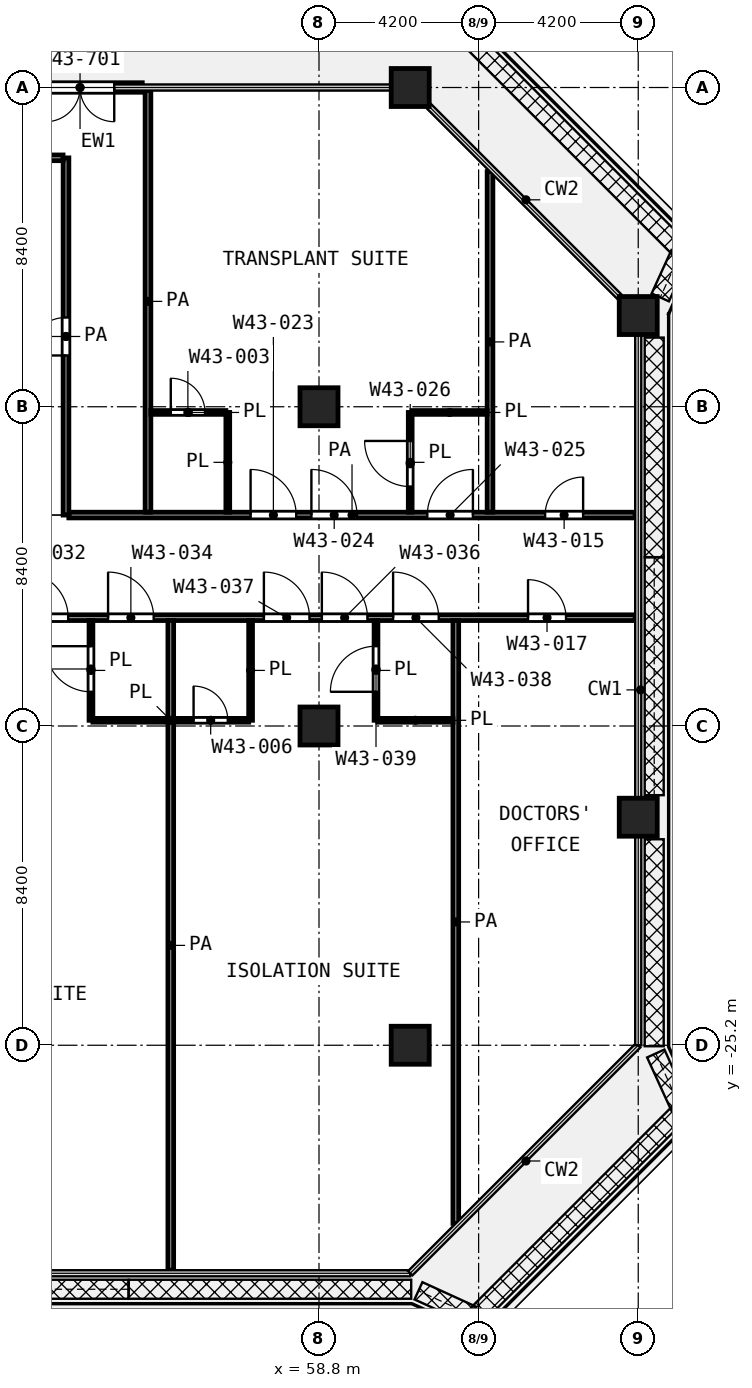
"""IFC4 building model, lengths in metres.
Left out: names, types, materials, properties, quantities, classifications, styles, units other than length and angle.
Written with IfcOpenShell. Run it as: python <this file> out.ifc"""

import sys

from ifc_helpers import new_model, si_unit, direction, frame, frame_2d, origin, origin_2d, place, context, subcontext, project, spatial, rectangle, extrude, element, fill, save


model = new_model("IFC4")
c1 = context("Model", 3, precision=1e-05, world=origin(), true_north=direction((0.0, 1.0)))
c2 = subcontext(c1, "Body", "Model", "MODEL_VIEW")
j1 = project(units=[si_unit("LENGTHUNIT", "METRE"), si_unit("PLANEANGLEUNIT", "RADIAN")], contexts=[c1])
p1 = place(None, origin())
s1 = spatial("IfcSite", under=j1, at=p1, CompositionType="ELEMENT")
p2 = place(p1, origin())
s2 = spatial("IfcBuilding", under=s1, at=p2, CompositionType="ELEMENT")
p3 = place(p2, frame((0.0, 0.0, 208.8)))
s3 = spatial("IfcBuildingStorey", under=s2, at=p3, CompositionType="ELEMENT", Elevation=208.8)
for number, where, z_axis, x_axis in (
    (1, (61.2, 0.0, 0.0), (0.0, 0.0, 1.0), (1.0, 0.0, 0.0)),
    (2, (67.2, -6.0, 0.0), (0.0, 0.0, 1.0), (1.0, 0.0, 0.0)),
    (3, (58.8, -8.4, 0.0), (0.0, 0.0, 1.0), (1.0, 0.0, 0.0)),
    (4, (58.8, -16.8, 0.0), (0.0, 0.0, 1.0), (1.0, 0.0, 0.0)),
    (5, (67.2, -19.2, 0.0), (0.0, 0.0, 1.0), (1.0, 0.0, 0.0)),
    (6, (61.2, -25.2, 0.0), (0.0, 0.0, 1.0), (1.0, 0.0, 0.0)),
):
    element("IfcColumn", number, at=place(p3, frame(where, z_axis=z_axis, x_axis=x_axis)), inside=s3, PredefinedType="COLUMN", context=c2, shape_type="SweptSolid", body=[
        extrude(rectangle(XDim=1.0, YDim=1.0, at=origin_2d()), origin(), (0.0, 0.0, 1.0), 4.2),
    ])
p4 = place(p3, frame((54.15, 0.0, 0.0), z_axis=(0.0, 0.0, 1.0), x_axis=(-1.0, 0.0, 0.0)))
e7 = element("IfcWall", 7, at=p4, inside=s3, PredefinedType="SOLIDWALL", context=c2, shape_type="SweptSolid", body=[
    extrude(rectangle(XDim=3.275, YDim=0.25, at=frame_2d((1.637, 0.0))), origin(), (0.0, 0.0, 1.0), 3.58),
])
p5 = place(p4, frame((0.738, 0.0, 0.0)))
e8 = element("IfcOpeningElement", 8, at=p5, cuts=e7, PredefinedType="OPENING", context=c2, shape_type="SweptSolid", body=[
    extrude(rectangle(XDim=1.8, YDim=2.1, at=frame_2d((0.9, 1.05))), frame((0.0, 0.135, 0.0), z_axis=(0.0, -1.0, 0.0), x_axis=(1.0, 0.0, 0.0)), (0.0, 0.0, 1.0), 0.27),
])
p6 = place(p3, frame((52.85, -16.65, 0.0), z_axis=(0.0, 0.0, 1.0), x_axis=(1.0, 0.0, 0.0)))
e9 = element("IfcWall", 9, at=p6, inside=s3, PredefinedType="PARTITIONING", context=c2, shape_type="SweptSolid", body=[
    extrude(rectangle(XDim=4.1, YDim=0.1, at=frame_2d((2.05, 0.0))), origin(), (0.0, 0.0, 1.0), 3.7),
])
p7 = place(p6, frame((2.65, 0.0, 0.0)))
e10 = element("IfcOpeningElement", 10, at=p7, cuts=e9, PredefinedType="OPENING", context=c2, shape_type="SweptSolid", body=[
    extrude(rectangle(XDim=0.9, YDim=2.1, at=frame_2d((0.45, 1.05))), frame((0.0, 0.06, 0.0), z_axis=(0.0, -1.0, 0.0), x_axis=(1.0, 0.0, 0.0)), (0.0, 0.0, 1.0), 0.12),
])
p8 = place(p3, frame((60.35, -16.65, 0.0), z_axis=(0.0, 0.0, 1.0), x_axis=(1.0, 0.0, 0.0)))
e11 = element("IfcWall", 11, at=p8, inside=s3, PredefinedType="PARTITIONING", context=c2, shape_type="SweptSolid", body=[
    extrude(rectangle(XDim=1.975, YDim=0.1, at=frame_2d((0.987, 0.0))), origin(), (0.0, 0.0, 1.0), 3.7),
])
p9 = place(p3, frame((54.375, -8.55, 0.0), z_axis=(0.0, 0.0, 1.0), x_axis=(1.0, 0.0, 0.0)))
e12 = element("IfcWall", 12, at=p9, inside=s3, PredefinedType="PARTITIONING", context=c2, shape_type="SweptSolid", body=[
    extrude(rectangle(XDim=1.975, YDim=0.1, at=frame_2d((0.988, 0.0))), origin(), (0.0, 0.0, 1.0), 3.7),
])
p10 = place(p9, frame((0.525, 0.0, 0.0)))
e13 = element("IfcOpeningElement", 13, at=p10, cuts=e12, PredefinedType="OPENING", context=c2, shape_type="SweptSolid", body=[
    extrude(rectangle(XDim=0.9, YDim=2.1, at=frame_2d((0.45, 1.05))), frame((0.0, 0.06, 0.0), z_axis=(0.0, -1.0, 0.0), x_axis=(1.0, 0.0, 0.0)), (0.0, 0.0, 1.0), 0.12),
])
p11 = place(p3, frame((61.25, -8.55, 0.0), z_axis=(0.0, 0.0, 1.0), x_axis=(1.0, 0.0, 0.0)))
e14 = element("IfcWall", 14, at=p11, inside=s3, PredefinedType="PARTITIONING", context=c2, shape_type="SweptSolid", body=[
    extrude(rectangle(XDim=1.975, YDim=0.1, at=frame_2d((0.988, 0.0))), origin(), (0.0, 0.0, 1.0), 3.7),
])
p12 = place(p3, frame((52.8, -16.65, 0.0), z_axis=(0.0, 0.0, 1.0), x_axis=(0.0, 1.0, 0.0)))
e15 = element("IfcWall", 15, at=p12, inside=s3, PredefinedType="PARTITIONING", context=c2, shape_type="SweptSolid", body=[
    extrude(rectangle(XDim=2.625, YDim=0.1, at=frame_2d((1.312, 0.0))), origin(), (0.0, 0.0, 1.0), 3.7),
])
p13 = place(p12, frame((0.75, 0.0, 0.0)))
e16 = element("IfcOpeningElement", 16, at=p13, cuts=e15, PredefinedType="OPENING", context=c2, shape_type="SweptSolid", body=[
    extrude(rectangle(XDim=1.2, YDim=2.1, at=frame_2d((0.6, 1.05))), frame((0.0, 0.06, 0.0), z_axis=(0.0, -1.0, 0.0), x_axis=(1.0, 0.0, 0.0)), (0.0, 0.0, 1.0), 0.12),
])
for number, where, z_axis, x_axis in (
    (17, (56.4, -11.175, 0.0), (0.0, 0.0, 1.0), (0.0, 1.0, 0.0)),
    (18, (57.0, -16.65, 0.0), (0.0, 0.0, 1.0), (0.0, 1.0, 0.0)),
):
    element("IfcWall", number, at=place(p3, frame(where, z_axis=z_axis, x_axis=x_axis)), inside=s3, PredefinedType="PARTITIONING", context=c2, shape_type="SweptSolid", body=[
        extrude(rectangle(XDim=2.625, YDim=0.1, at=frame_2d((1.312, 0.0))), origin(), (0.0, 0.0, 1.0), 3.7),
    ])
p14 = place(p3, frame((60.3, -16.65, 0.0), z_axis=(0.0, 0.0, 1.0), x_axis=(0.0, 1.0, 0.0)))
e19 = element("IfcWall", 19, at=p14, inside=s3, PredefinedType="PARTITIONING", context=c2, shape_type="SweptSolid", body=[
    extrude(rectangle(XDim=2.625, YDim=0.1, at=frame_2d((1.312, 0.0))), origin(), (0.0, 0.0, 1.0), 3.7),
])
p15 = place(p14, frame((0.75, 0.0, 0.0)))
e20 = element("IfcOpeningElement", 20, at=p15, cuts=e19, PredefinedType="OPENING", context=c2, shape_type="SweptSolid", body=[
    extrude(rectangle(XDim=1.2, YDim=2.1, at=frame_2d((0.6, 1.05))), frame((0.0, 0.06, 0.0), z_axis=(0.0, -1.0, 0.0), x_axis=(1.0, 0.0, 0.0)), (0.0, 0.0, 1.0), 0.12),
])
p16 = place(p3, frame((61.2, -11.175, 0.0), z_axis=(0.0, 0.0, 1.0), x_axis=(0.0, 1.0, 0.0)))
e21 = element("IfcWall", 21, at=p16, inside=s3, PredefinedType="PARTITIONING", context=c2, shape_type="SweptSolid", body=[
    extrude(rectangle(XDim=2.625, YDim=0.1, at=frame_2d((1.312, 0.0))), origin(), (0.0, 0.0, 1.0), 3.7),
])
p17 = place(p16, frame((0.675, 0.0, 0.0)))
e22 = element("IfcOpeningElement", 22, at=p17, cuts=e21, PredefinedType="OPENING", context=c2, shape_type="SweptSolid", body=[
    extrude(rectangle(XDim=1.2, YDim=2.1, at=frame_2d((0.6, 1.05))), frame((0.0, 0.06, 0.0), z_axis=(0.0, -1.0, 0.0), x_axis=(1.0, 0.0, 0.0)), (0.0, 0.0, 1.0), 0.12),
])
p18 = place(p3, frame((29.4, -13.95, 0.0), z_axis=(0.0, 0.0, 1.0), x_axis=(1.0, 0.0, 0.0)))
e23 = element("IfcWall", 23, at=p18, inside=s3, PredefinedType="PARTITIONING", context=c2, shape_type="SweptSolid", body=[
    extrude(rectangle(XDim=37.72, YDim=0.15, at=frame_2d((18.86, 0.0))), origin(), (0.0, 0.0, 1.0), 3.7),
])
p19 = place(p18, frame((1.6, 0.0, 0.0)))
e24 = element("IfcOpeningElement", 24, at=p19, cuts=e23, PredefinedType="OPENING", context=c2, shape_type="SweptSolid", body=[
    extrude(rectangle(XDim=1.0, YDim=2.1, at=frame_2d((0.5, 1.05))), frame((0.0, 0.085, 0.0), z_axis=(0.0, -1.0, 0.0), x_axis=(1.0, 0.0, 0.0)), (0.0, 0.0, 1.0), 0.17),
])
p20 = place(p18, frame((6.0, 0.0, 0.0)))
e25 = element("IfcOpeningElement", 25, at=p20, cuts=e23, PredefinedType="OPENING", context=c2, shape_type="SweptSolid", body=[
    extrude(rectangle(XDim=1.2, YDim=2.1, at=frame_2d((0.6, 1.05))), frame((0.0, 0.085, 0.0), z_axis=(0.0, -1.0, 0.0), x_axis=(1.0, 0.0, 0.0)), (0.0, 0.0, 1.0), 0.17),
])
p21 = place(p18, frame((12.975, 0.0, 0.0)))
e26 = element("IfcOpeningElement", 26, at=p21, cuts=e23, PredefinedType="OPENING", context=c2, shape_type="SweptSolid", body=[
    extrude(rectangle(XDim=1.2, YDim=2.1, at=frame_2d((0.6, 1.05))), frame((0.0, 0.085, 0.0), z_axis=(0.0, -1.0, 0.0), x_axis=(1.0, 0.0, 0.0)), (0.0, 0.0, 1.0), 0.17),
])
p22 = place(p18, frame((11.45, 0.0, 0.0)))
e27 = element("IfcOpeningElement", 27, at=p22, cuts=e23, PredefinedType="OPENING", context=c2, shape_type="SweptSolid", body=[
    extrude(rectangle(XDim=1.2, YDim=2.1, at=frame_2d((0.6, 1.05))), frame((0.0, 0.085, 0.0), z_axis=(0.0, -1.0, 0.0), x_axis=(1.0, 0.0, 0.0)), (0.0, 0.0, 1.0), 0.17),
])
p23 = place(p18, frame((14.85, 0.0, 0.0)))
e28 = element("IfcOpeningElement", 28, at=p23, cuts=e23, PredefinedType="OPENING", context=c2, shape_type="SweptSolid", body=[
    extrude(rectangle(XDim=1.2, YDim=2.1, at=frame_2d((0.6, 1.05))), frame((0.0, 0.085, 0.0), z_axis=(0.0, -1.0, 0.0), x_axis=(1.0, 0.0, 0.0)), (0.0, 0.0, 1.0), 0.17),
])
p24 = place(p18, frame((21.6, 0.0, 0.0)))
e29 = element("IfcOpeningElement", 29, at=p24, cuts=e23, PredefinedType="OPENING", context=c2, shape_type="SweptSolid", body=[
    extrude(rectangle(XDim=1.2, YDim=2.1, at=frame_2d((0.6, 1.05))), frame((0.0, 0.085, 0.0), z_axis=(0.0, -1.0, 0.0), x_axis=(1.0, 0.0, 0.0)), (0.0, 0.0, 1.0), 0.17),
])
p25 = place(p18, frame((20.1, 0.0, 0.0)))
e30 = element("IfcOpeningElement", 30, at=p25, cuts=e23, PredefinedType="OPENING", context=c2, shape_type="SweptSolid", body=[
    extrude(rectangle(XDim=1.2, YDim=2.1, at=frame_2d((0.6, 1.05))), frame((0.0, 0.085, 0.0), z_axis=(0.0, -1.0, 0.0), x_axis=(1.0, 0.0, 0.0)), (0.0, 0.0, 1.0), 0.17),
])
p26 = place(p18, frame((18.85, 0.0, 0.0)))
e31 = element("IfcOpeningElement", 31, at=p26, cuts=e23, PredefinedType="OPENING", context=c2, shape_type="SweptSolid", body=[
    extrude(rectangle(XDim=0.9, YDim=2.1, at=frame_2d((0.45, 1.05))), frame((0.0, 0.085, 0.0), z_axis=(0.0, -1.0, 0.0), x_axis=(1.0, 0.0, 0.0)), (0.0, 0.0, 1.0), 0.17),
])
p27 = place(p18, frame((23.85, 0.0, 0.0)))
e32 = element("IfcOpeningElement", 32, at=p27, cuts=e23, PredefinedType="OPENING", context=c2, shape_type="SweptSolid", body=[
    extrude(rectangle(XDim=1.2, YDim=2.1, at=frame_2d((0.6, 1.05))), frame((0.0, 0.085, 0.0), z_axis=(0.0, -1.0, 0.0), x_axis=(1.0, 0.0, 0.0)), (0.0, 0.0, 1.0), 0.17),
])
p28 = place(p18, frame((29.475, 0.0, 0.0)))
e33 = element("IfcOpeningElement", 33, at=p28, cuts=e23, PredefinedType="OPENING", context=c2, shape_type="SweptSolid", body=[
    extrude(rectangle(XDim=1.2, YDim=2.1, at=frame_2d((0.6, 1.05))), frame((0.0, 0.085, 0.0), z_axis=(0.0, -1.0, 0.0), x_axis=(1.0, 0.0, 0.0)), (0.0, 0.0, 1.0), 0.17),
])
p29 = place(p18, frame((27.95, 0.0, 0.0)))
e34 = element("IfcOpeningElement", 34, at=p29, cuts=e23, PredefinedType="OPENING", context=c2, shape_type="SweptSolid", body=[
    extrude(rectangle(XDim=1.2, YDim=2.1, at=frame_2d((0.6, 1.05))), frame((0.0, 0.085, 0.0), z_axis=(0.0, -1.0, 0.0), x_axis=(1.0, 0.0, 0.0)), (0.0, 0.0, 1.0), 0.17),
])
p30 = place(p18, frame((31.35, 0.0, 0.0)))
e35 = element("IfcOpeningElement", 35, at=p30, cuts=e23, PredefinedType="OPENING", context=c2, shape_type="SweptSolid", body=[
    extrude(rectangle(XDim=1.2, YDim=2.1, at=frame_2d((0.6, 1.05))), frame((0.0, 0.085, 0.0), z_axis=(0.0, -1.0, 0.0), x_axis=(1.0, 0.0, 0.0)), (0.0, 0.0, 1.0), 0.17),
])
p31 = place(p18, frame((34.9, 0.0, 0.0)))
e36 = element("IfcOpeningElement", 36, at=p31, cuts=e23, PredefinedType="OPENING", context=c2, shape_type="SweptSolid", body=[
    extrude(rectangle(XDim=1.0, YDim=2.1, at=frame_2d((0.5, 1.05))), frame((0.0, 0.085, 0.0), z_axis=(0.0, -1.0, 0.0), x_axis=(1.0, 0.0, 0.0)), (0.0, 0.0, 1.0), 0.17),
])
p32 = place(p3, frame((52.218, -11.25, 0.0), z_axis=(0.0, 0.0, 1.0), x_axis=(1.0, 0.0, 0.0)))
e37 = element("IfcWall", 37, at=p32, inside=s3, PredefinedType="PARTITIONING", context=c2, shape_type="SweptSolid", body=[
    extrude(rectangle(XDim=14.902, YDim=0.15, at=frame_2d((7.451, 0.0))), origin(), (0.0, 0.0, 1.0), 3.7),
])
p33 = place(p32, frame((4.782, 0.0, 0.0)))
e38 = element("IfcOpeningElement", 38, at=p33, cuts=e37, PredefinedType="OPENING", context=c2, shape_type="SweptSolid", body=[
    extrude(rectangle(XDim=1.2, YDim=2.1, at=frame_2d((0.6, 1.05))), frame((0.0, 0.085, 0.0), z_axis=(0.0, -1.0, 0.0), x_axis=(1.0, 0.0, 0.0)), (0.0, 0.0, 1.0), 0.17),
])
p34 = place(p32, frame((6.382, 0.0, 0.0)))
e39 = element("IfcOpeningElement", 39, at=p34, cuts=e37, PredefinedType="OPENING", context=c2, shape_type="SweptSolid", body=[
    extrude(rectangle(XDim=1.2, YDim=2.1, at=frame_2d((0.6, 1.05))), frame((0.0, 0.085, 0.0), z_axis=(0.0, -1.0, 0.0), x_axis=(1.0, 0.0, 0.0)), (0.0, 0.0, 1.0), 0.17),
])
p35 = place(p32, frame((9.432, 0.0, 0.0)))
e40 = element("IfcOpeningElement", 40, at=p35, cuts=e37, PredefinedType="OPENING", context=c2, shape_type="SweptSolid", body=[
    extrude(rectangle(XDim=1.2, YDim=2.1, at=frame_2d((0.6, 1.05))), frame((0.0, 0.085, 0.0), z_axis=(0.0, -1.0, 0.0), x_axis=(1.0, 0.0, 0.0)), (0.0, 0.0, 1.0), 0.17),
])
p36 = place(p32, frame((12.532, 0.0, 0.0)))
e41 = element("IfcOpeningElement", 41, at=p36, cuts=e37, PredefinedType="OPENING", context=c2, shape_type="SweptSolid", body=[
    extrude(rectangle(XDim=1.0, YDim=2.1, at=frame_2d((0.5, 1.05))), frame((0.0, 0.085, 0.0), z_axis=(0.0, -1.0, 0.0), x_axis=(1.0, 0.0, 0.0)), (0.0, 0.0, 1.0), 0.17),
])
p37 = place(p3, frame((48.6, -1.85, 0.0), z_axis=(0.0, 0.0, 1.0), x_axis=(1.0, 0.0, 0.0)))
e42 = element("IfcWall", 42, at=p37, inside=s3, PredefinedType="PARTITIONING", context=c2, shape_type="SweptSolid", body=[
    extrude(rectangle(XDim=3.466, YDim=0.15, at=frame_2d((1.733, 0.0))), origin(), (0.0, 0.0, 1.0), 3.7),
])
p38 = place(p3, frame((52.143, -11.25, 0.0), z_axis=(0.0, 0.0, 1.0), x_axis=(0.0, 1.0, 0.0)))
e43 = element("IfcWall", 43, at=p38, inside=s3, PredefinedType="PARTITIONING", context=c2, shape_type="SweptSolid", body=[
    extrude(rectangle(XDim=9.398, YDim=0.15, at=frame_2d((4.699, 0.0))), origin(), (0.0, 0.0, 1.0), 3.7),
])
p39 = place(p38, frame((4.199, 0.0, 0.0)))
e44 = element("IfcOpeningElement", 44, at=p39, cuts=e43, PredefinedType="OPENING", context=c2, shape_type="SweptSolid", body=[
    extrude(rectangle(XDim=1.0, YDim=2.1, at=frame_2d((0.5, 1.05))), frame((0.0, 0.085, 0.0), z_axis=(0.0, -1.0, 0.0), x_axis=(1.0, 0.0, 0.0)), (0.0, 0.0, 1.0), 0.17),
])
p40 = place(p3, frame((54.3, -11.175, 0.0), z_axis=(0.0, 0.0, 1.0), x_axis=(0.0, 1.0, 0.0)))
e45 = element("IfcWall", 45, at=p40, inside=s3, PredefinedType="PARTITIONING", context=c2, shape_type="SweptSolid", body=[
    extrude(rectangle(XDim=11.095, YDim=0.15, at=frame_2d((5.547, 0.0))), origin(), (0.0, 0.0, 1.0), 3.7),
])
p41 = place(p3, frame((54.9, -31.12, 0.0), z_axis=(0.0, 0.0, 1.0), x_axis=(0.0, 1.0, 0.0)))
e46 = element("IfcWall", 46, at=p41, inside=s3, PredefinedType="PARTITIONING", context=c2, shape_type="SweptSolid", body=[
    extrude(rectangle(XDim=17.095, YDim=0.15, at=frame_2d((8.548, 0.0))), origin(), (0.0, 0.0, 1.0), 3.7),
])
p42 = place(p3, frame((62.4, -29.887, 0.0), z_axis=(0.0, 0.0, 1.0), x_axis=(0.0, 1.0, 0.0)))
e47 = element("IfcWall", 47, at=p42, inside=s3, PredefinedType="PARTITIONING", context=c2, shape_type="SweptSolid", body=[
    extrude(rectangle(XDim=15.862, YDim=0.15, at=frame_2d((7.931, 0.0))), origin(), (0.0, 0.0, 1.0), 3.7),
])
p43 = place(p3, frame((63.3, -11.175, 0.0), z_axis=(0.0, 0.0, 1.0), x_axis=(0.0, 1.0, 0.0)))
e48 = element("IfcWall", 48, at=p43, inside=s3, PredefinedType="PARTITIONING", context=c2, shape_type="SweptSolid", body=[
    extrude(rectangle(XDim=8.962, YDim=0.15, at=frame_2d((4.481, 0.0))), origin(), (0.0, 0.0, 1.0), 3.7),
])
p44 = place(p5, origin())
e49 = element("IfcDoor", 49, at=p44, inside=s3, OperationType="DOUBLE_DOOR_SINGLE_SWING", PredefinedType="DOOR", context=c2, shape_type="SweptSolid", body=[
    extrude(rectangle(XDim=1.8, YDim=2.1, at=frame_2d((0.9, 1.05))), frame((0.0, 0.025, 0.0), z_axis=(0.0, -1.0, 0.0), x_axis=(1.0, 0.0, 0.0)), (0.0, 0.0, 1.0), 0.05),
])
fill(e8, e49)
p45 = place(p39, origin())
e50 = element("IfcDoor", 50, at=p45, inside=s3, OperationType="SINGLE_SWING_LEFT", PredefinedType="DOOR", context=c2, shape_type="SweptSolid", body=[
    extrude(rectangle(XDim=1.0, YDim=2.1, at=frame_2d((0.5, 1.05))), frame((0.0, 0.025, 0.0), z_axis=(0.0, -1.0, 0.0), x_axis=(1.0, 0.0, 0.0)), (0.0, 0.0, 1.0), 0.05),
])
fill(e44, e50)
p46 = place(p33, origin())
e51 = element("IfcDoor", 51, at=p46, inside=s3, OperationType="SINGLE_SWING_LEFT", PredefinedType="DOOR", context=c2, shape_type="SweptSolid", body=[
    extrude(rectangle(XDim=1.2, YDim=2.1, at=frame_2d((0.6, 1.05))), frame((0.0, 0.025, 0.0), z_axis=(0.0, -1.0, 0.0), x_axis=(1.0, 0.0, 0.0)), (0.0, 0.0, 1.0), 0.05),
])
fill(e38, e51)
p47 = place(p34, origin())
e52 = element("IfcDoor", 52, at=p47, inside=s3, OperationType="SINGLE_SWING_LEFT", PredefinedType="DOOR", context=c2, shape_type="SweptSolid", body=[
    extrude(rectangle(XDim=1.2, YDim=2.1, at=frame_2d((0.6, 1.05))), frame((0.0, 0.025, 0.0), z_axis=(0.0, -1.0, 0.0), x_axis=(1.0, 0.0, 0.0)), (0.0, 0.0, 1.0), 0.05),
])
fill(e39, e52)
p48 = place(p35, origin())
e53 = element("IfcDoor", 53, at=p48, inside=s3, OperationType="SINGLE_SWING_RIGHT", PredefinedType="DOOR", context=c2, shape_type="SweptSolid", body=[
    extrude(rectangle(XDim=1.2, YDim=2.1, at=frame_2d((0.6, 1.05))), frame((0.0, 0.025, 0.0), z_axis=(0.0, -1.0, 0.0), x_axis=(1.0, 0.0, 0.0)), (0.0, 0.0, 1.0), 0.05),
])
fill(e40, e53)
p49 = place(p17, origin())
e54 = element("IfcDoor", 54, at=p49, inside=s3, OperationType="SINGLE_SWING_RIGHT", PredefinedType="DOOR", context=c2, shape_type="SweptSolid", body=[
    extrude(rectangle(XDim=1.2, YDim=2.1, at=frame_2d((0.6, 1.05))), frame((0.0, 0.025, 0.0), z_axis=(0.0, -1.0, 0.0), x_axis=(1.0, 0.0, 0.0)), (0.0, 0.0, 1.0), 0.05),
])
fill(e22, e54)
p50 = place(p10, origin())
e55 = element("IfcDoor", 55, at=p50, inside=s3, OperationType="SINGLE_SWING_LEFT", PredefinedType="DOOR", context=c2, shape_type="SweptSolid", body=[
    extrude(rectangle(XDim=0.9, YDim=2.1, at=frame_2d((0.45, 1.05))), frame((0.0, 0.025, 0.0), z_axis=(0.0, -1.0, 0.0), x_axis=(1.0, 0.0, 0.0)), (0.0, 0.0, 1.0), 0.05),
])
fill(e13, e55)
p51 = place(p36, origin())
e56 = element("IfcDoor", 56, at=p51, inside=s3, OperationType="SINGLE_SWING_RIGHT", PredefinedType="DOOR", context=c2, shape_type="SweptSolid", body=[
    extrude(rectangle(XDim=1.0, YDim=2.1, at=frame_2d((0.5, 1.05))), frame((0.0, 0.025, 0.0), z_axis=(0.0, -1.0, 0.0), x_axis=(1.0, 0.0, 0.0)), (0.0, 0.0, 1.0), 0.05),
])
fill(e41, e56)
p52 = place(p24, origin())
e57 = element("IfcDoor", 57, at=p52, inside=s3, OperationType="SINGLE_SWING_LEFT", PredefinedType="DOOR", context=c2, shape_type="SweptSolid", body=[
    extrude(rectangle(XDim=1.2, YDim=2.1, at=frame_2d((0.6, 1.05))), frame((0.0, 0.025, 0.0), z_axis=(0.0, -1.0, 0.0), x_axis=(1.0, 0.0, 0.0)), (0.0, 0.0, 1.0), 0.05),
])
fill(e29, e57)
p53 = place(p27, origin())
e58 = element("IfcDoor", 58, at=p53, inside=s3, OperationType="SINGLE_SWING_LEFT", PredefinedType="DOOR", context=c2, shape_type="SweptSolid", body=[
    extrude(rectangle(XDim=1.2, YDim=2.1, at=frame_2d((0.6, 1.05))), frame((0.0, 0.025, 0.0), z_axis=(0.0, -1.0, 0.0), x_axis=(1.0, 0.0, 0.0)), (0.0, 0.0, 1.0), 0.05),
])
fill(e32, e58)
p54 = place(p13, origin())
e59 = element("IfcDoor", 59, at=p54, inside=s3, OperationType="SINGLE_SWING_RIGHT", PredefinedType="DOOR", context=c2, shape_type="SweptSolid", body=[
    extrude(rectangle(XDim=1.2, YDim=2.1, at=frame_2d((0.6, 1.05))), frame((0.0, 0.025, 0.0), z_axis=(0.0, -1.0, 0.0), x_axis=(1.0, 0.0, 0.0)), (0.0, 0.0, 1.0), 0.05),
])
fill(e16, e59)
p55 = place(p28, origin())
e60 = element("IfcDoor", 60, at=p55, inside=s3, OperationType="SINGLE_SWING_LEFT", PredefinedType="DOOR", context=c2, shape_type="SweptSolid", body=[
    extrude(rectangle(XDim=1.2, YDim=2.1, at=frame_2d((0.6, 1.05))), frame((0.0, 0.025, 0.0), z_axis=(0.0, -1.0, 0.0), x_axis=(1.0, 0.0, 0.0)), (0.0, 0.0, 1.0), 0.05),
])
fill(e33, e60)
p56 = place(p29, origin())
e61 = element("IfcDoor", 61, at=p56, inside=s3, OperationType="SINGLE_SWING_LEFT", PredefinedType="DOOR", context=c2, shape_type="SweptSolid", body=[
    extrude(rectangle(XDim=1.2, YDim=2.1, at=frame_2d((0.6, 1.05))), frame((0.0, 0.025, 0.0), z_axis=(0.0, -1.0, 0.0), x_axis=(1.0, 0.0, 0.0)), (0.0, 0.0, 1.0), 0.05),
])
fill(e34, e61)
p57 = place(p30, origin())
e62 = element("IfcDoor", 62, at=p57, inside=s3, OperationType="SINGLE_SWING_LEFT", PredefinedType="DOOR", context=c2, shape_type="SweptSolid", body=[
    extrude(rectangle(XDim=1.2, YDim=2.1, at=frame_2d((0.6, 1.05))), frame((0.0, 0.025, 0.0), z_axis=(0.0, -1.0, 0.0), x_axis=(1.0, 0.0, 0.0)), (0.0, 0.0, 1.0), 0.05),
])
fill(e35, e62)
p58 = place(p15, origin())
e63 = element("IfcDoor", 63, at=p58, inside=s3, OperationType="SINGLE_SWING_LEFT", PredefinedType="DOOR", context=c2, shape_type="SweptSolid", body=[
    extrude(rectangle(XDim=1.2, YDim=2.1, at=frame_2d((0.6, 1.05))), frame((0.0, 0.025, 0.0), z_axis=(0.0, -1.0, 0.0), x_axis=(1.0, 0.0, 0.0)), (0.0, 0.0, 1.0), 0.05),
])
fill(e20, e63)
p59 = place(p7, origin())
e64 = element("IfcDoor", 64, at=p59, inside=s3, OperationType="SINGLE_SWING_LEFT", PredefinedType="DOOR", context=c2, shape_type="SweptSolid", body=[
    extrude(rectangle(XDim=0.9, YDim=2.1, at=frame_2d((0.45, 1.05))), frame((0.0, 0.025, 0.0), z_axis=(0.0, -1.0, 0.0), x_axis=(1.0, 0.0, 0.0)), (0.0, 0.0, 1.0), 0.05),
])
fill(e10, e64)
p60 = place(p31, origin())
e65 = element("IfcDoor", 65, at=p60, inside=s3, OperationType="SINGLE_SWING_LEFT", PredefinedType="DOOR", context=c2, shape_type="SweptSolid", body=[
    extrude(rectangle(XDim=1.0, YDim=2.1, at=frame_2d((0.5, 1.05))), frame((0.0, 0.025, 0.0), z_axis=(0.0, -1.0, 0.0), x_axis=(1.0, 0.0, 0.0)), (0.0, 0.0, 1.0), 0.05),
])
fill(e36, e65)
save(model, sys.argv[1])
